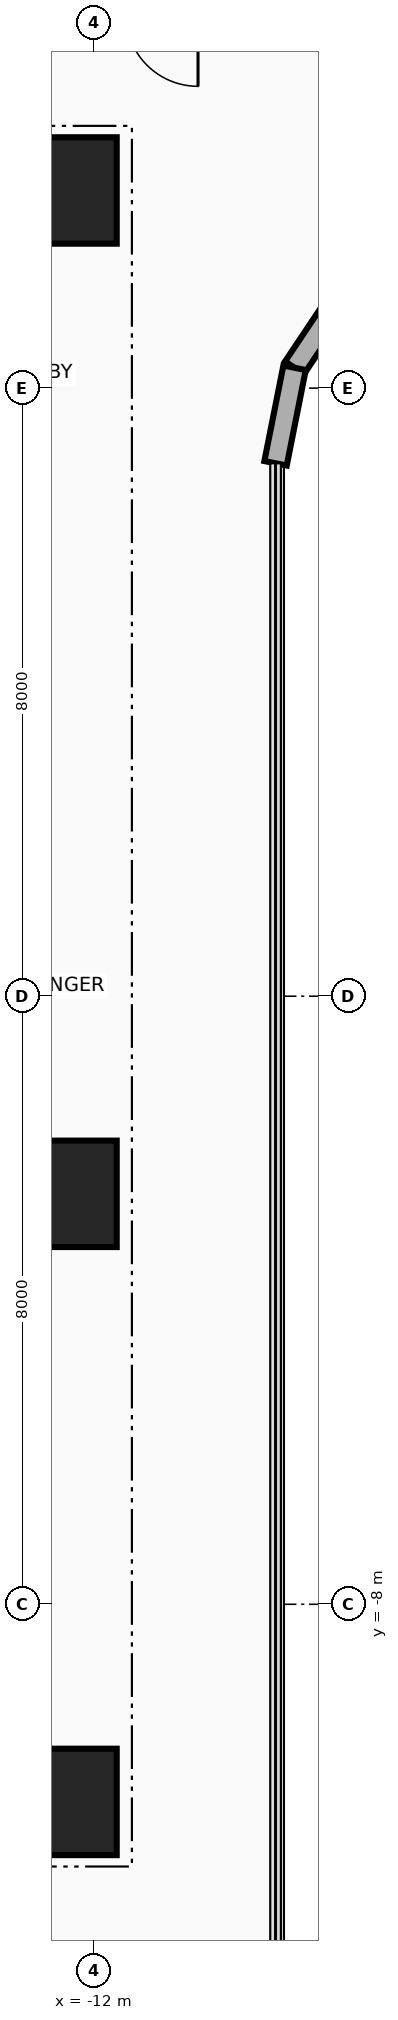
"""IFC4 building model, lengths in metres.
Left out: names, types, materials, properties, quantities, classifications, styles, units other than length and angle.
Written with IfcOpenShell. Run it as: python <this file> out.ifc"""

import sys

from ifc_helpers import new_model, si_unit, direction, frame, frame_2d, origin, origin_2d, place, context, subcontext, project, spatial, rectangle, extrude, source, transform, mapped, element, save


model = new_model("IFC4")
c1 = context("Model", 3, precision=1e-05, world=origin(), true_north=direction((0.0, 1.0)))
c2 = subcontext(c1, "Body", "Model", "MODEL_VIEW")
j1 = project(units=[si_unit("LENGTHUNIT", "METRE"), si_unit("PLANEANGLEUNIT", "RADIAN")], contexts=[c1])
p1 = place(None, origin())
s1 = spatial("IfcSite", under=j1, at=p1, CompositionType="ELEMENT")
p2 = place(p1, origin())
s2 = spatial("IfcBuilding", under=s1, at=p2, CompositionType="ELEMENT")
p3 = place(p2, frame((0.0, 0.0, 29.7)))
s3 = spatial("IfcBuildingStorey", under=s2, at=p3, CompositionType="ELEMENT", Elevation=29.7)
for number, where, z_axis, x_axis in (
    (1, (-22.65, 10.8, 0.0), (0.0, 0.0, 1.0), (1.0, 0.0, 0.0)),
    (2, (-22.65, -10.8, 0.0), (0.0, 0.0, 1.0), (1.0, 0.0, 0.0)),
):
    element("IfcWall", number, at=place(p3, frame(where, z_axis=z_axis, x_axis=x_axis)), inside=s3, PredefinedType="SHEAR", context=c2, shape_type="SweptSolid", body=[
        extrude(rectangle(XDim=10.25, YDim=0.7, at=frame_2d((5.125, 0.0))), origin(), (0.0, 0.0, 1.0), 3.46),
    ])
m1 = source(origin(), c2, "Body", "SweptSolid", [
    extrude(rectangle(XDim=1.4, YDim=1.4, at=origin_2d()), origin(), (0.0, 0.0, 1.0), 3.7),
])
for number, where, z_axis, x_axis in (
    (3, (-12.4, -10.6, 0.0), (0.0, 0.0, 1.0), (1.0, 0.0, 0.0)),
    (4, (-12.4, -2.6, 0.0), (0.0, 0.0, 1.0), (1.0, 0.0, 0.0)),
    (5, (-12.4, 10.6, 0.0), (0.0, 0.0, 1.0), (1.0, 0.0, 0.0)),
):
    element("IfcColumn", number, at=place(p3, frame(where, z_axis=z_axis, x_axis=x_axis)), inside=s3, PredefinedType="COLUMN", context=c2, shape_type="MappedRepresentation", body=[
        mapped(m1, transform((0.0, 0.0, 0.0), x_axis=(1.0, 0.0, 0.0), y_axis=(0.0, 1.0, 0.0), z_axis=(0.0, 0.0, 1.0), scale=1.0)),
    ])
p4 = place(p3, frame((-8.642, 9.342, 0.0), z_axis=(0.0, 0.0, 1.0), x_axis=(-0.555615398575, -0.831439431869, 0.0)))
e6 = element("IfcWall", 6, at=p4, inside=s3, PredefinedType="SOLIDWALL", context=c2, shape_type="SweptSolid", body=[
    extrude(rectangle(XDim=1.292, YDim=0.3, at=frame_2d((0.646, 0.0))), origin(), (0.0, 0.0, 1.0), 3.46),
])
p5 = place(p3, frame((-9.36, 8.268, 0.0), z_axis=(0.0, 0.0, 1.0), x_axis=(-0.195090163074, -0.980785312019, 0.0)))
e7 = element("IfcWall", 7, at=p5, inside=s3, PredefinedType="SOLIDWALL", context=c2, shape_type="SweptSolid", body=[
    extrude(rectangle(XDim=1.281, YDim=0.3, at=frame_2d((0.641, 0.0))), origin(), (0.0, 0.0, 1.0), 3.46),
])
save(model, sys.argv[1])
